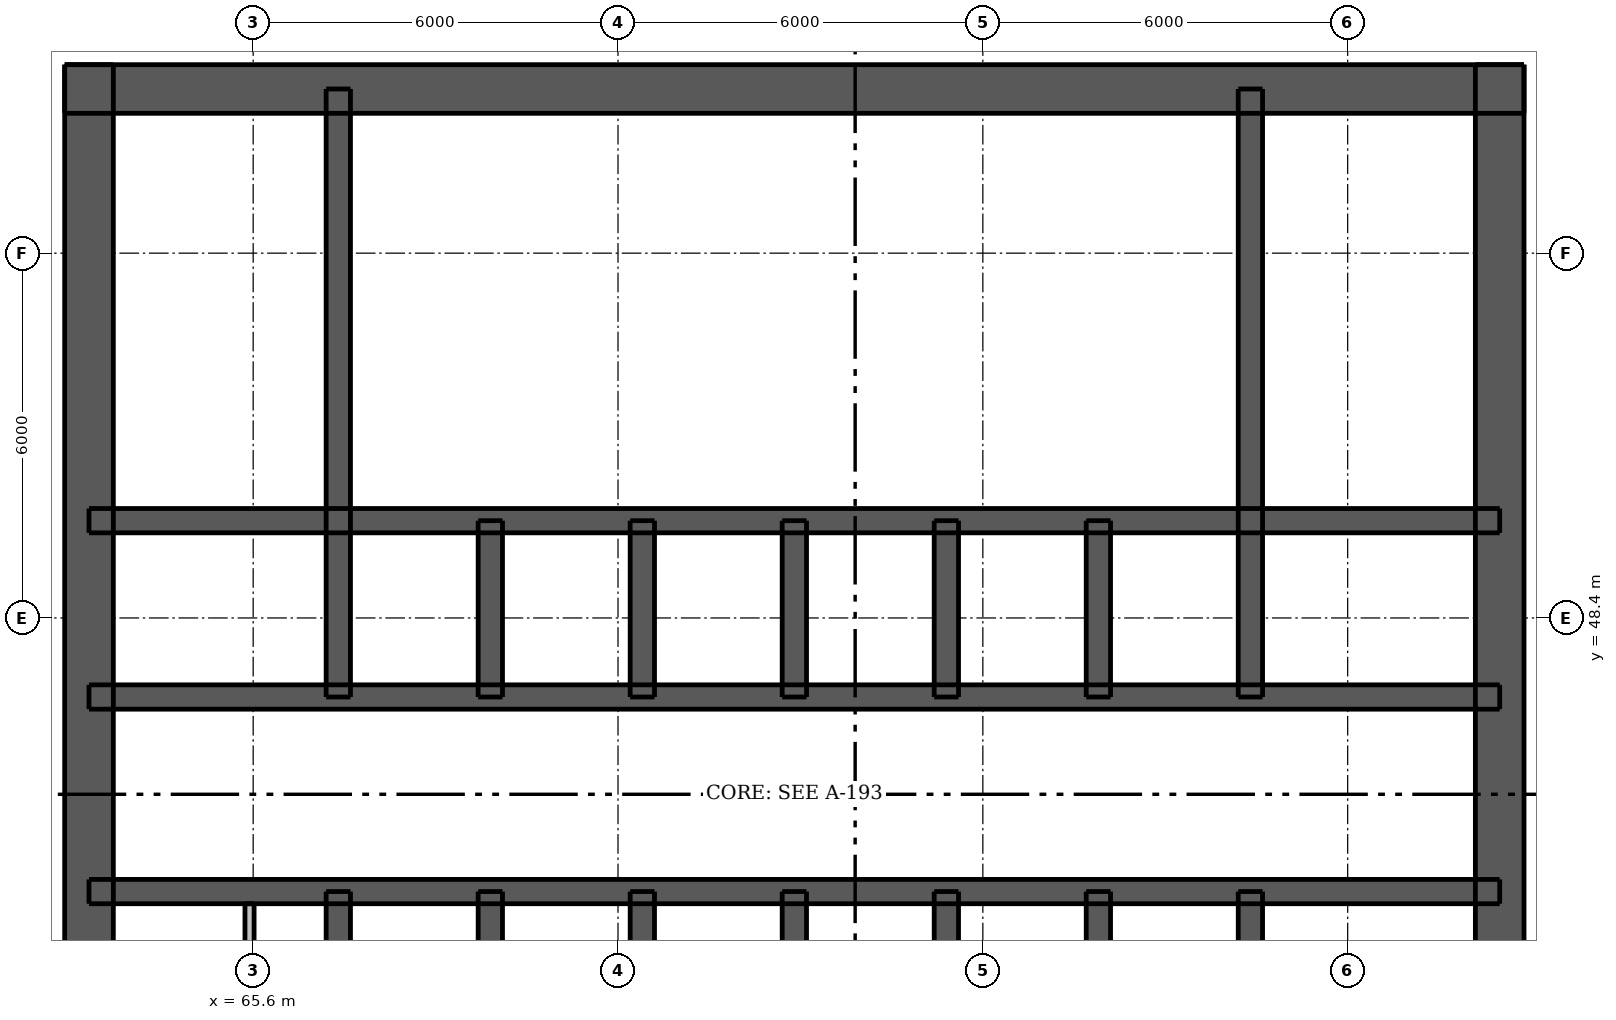
"""IFC4 building model, lengths in metres.
Left out: names, types, materials, properties, quantities, classifications, styles, units other than length and angle.
Written with IfcOpenShell. Run it as: python <this file> out.ifc"""

import sys

from ifc_helpers import new_model, si_unit, direction, frame, frame_2d, origin, place, context, subcontext, project, spatial, rectangle, extrude, element, fill, save


model = new_model("IFC4")
c1 = context("Model", 3, precision=1e-05, world=origin(), true_north=direction((0.0, 1.0)))
c2 = subcontext(c1, "Body", "Model", "MODEL_VIEW")
j1 = project(units=[si_unit("LENGTHUNIT", "METRE"), si_unit("PLANEANGLEUNIT", "RADIAN")], contexts=[c1])
p1 = place(None, origin())
s1 = spatial("IfcSite", under=j1, at=p1, CompositionType="ELEMENT")
p2 = place(p1, origin())
s2 = spatial("IfcBuilding", under=s1, at=p2, CompositionType="ELEMENT")
p3 = place(p2, frame((0.0, 0.0, 88.6)))
s3 = spatial("IfcBuildingStorey", under=s2, at=p3, CompositionType="ELEMENT", Elevation=88.6)
p4 = place(p3, frame((62.5, 57.1, 0.0), z_axis=(0.0, 0.0, 1.0), x_axis=(1.0, 0.0, 0.0)))
e1 = element("IfcWall", 1, at=p4, inside=s3, PredefinedType="SHEAR", context=c2, shape_type="SweptSolid", body=[
    extrude(rectangle(XDim=24.0, YDim=0.8, at=frame_2d((12.0, 0.0))), origin(), (0.0, 0.0, 1.0), 3.05),
])
p5 = place(p4, frame((20.9, 0.0, 0.0)))
e2 = element("IfcOpeningElement", 2, at=p5, cuts=e1, PredefinedType="OPENING", context=c2, shape_type="SweptSolid", body=[
    extrude(rectangle(XDim=1.1, YDim=2.1, at=frame_2d((0.55, 1.05))), frame((0.0, 0.41, 0.0), z_axis=(0.0, -1.0, 0.0), x_axis=(1.0, 0.0, 0.0)), (0.0, 0.0, 1.0), 0.82),
])
p6 = place(p4, frame((2.0, 0.0, 0.0)))
e3 = element("IfcOpeningElement", 3, at=p6, cuts=e1, PredefinedType="OPENING", context=c2, shape_type="SweptSolid", body=[
    extrude(rectangle(XDim=1.1, YDim=2.1, at=frame_2d((0.55, 1.05))), frame((0.0, 0.41, 0.0), z_axis=(0.0, -1.0, 0.0), x_axis=(1.0, 0.0, 0.0)), (0.0, 0.0, 1.0), 0.82),
])
p7 = place(p4, frame((11.55, 0.0, 0.0)))
e4 = element("IfcOpeningElement", 4, at=p7, cuts=e1, PredefinedType="OPENING", context=c2, shape_type="SweptSolid", body=[
    extrude(rectangle(XDim=0.9, YDim=2.1, at=frame_2d((0.45, 1.05))), frame((0.0, 0.41, 0.0), z_axis=(0.0, -1.0, 0.0), x_axis=(1.0, 0.0, 0.0)), (0.0, 0.0, 1.0), 0.82),
])
p8 = place(p3, frame((62.9, 33.5, 0.0), z_axis=(0.0, 0.0, 1.0), x_axis=(0.0, 1.0, 0.0)))
e5 = element("IfcWall", 5, at=p8, inside=s3, PredefinedType="SHEAR", context=c2, shape_type="SweptSolid", body=[
    extrude(rectangle(XDim=24.0, YDim=0.8, at=frame_2d((12.0, 0.0))), origin(), (0.0, 0.0, 1.0), 3.05),
])
p9 = place(p8, frame((11.2, 0.0, 0.0)))
e6 = element("IfcOpeningElement", 6, at=p9, cuts=e5, PredefinedType="OPENING", context=c2, shape_type="SweptSolid", body=[
    extrude(rectangle(XDim=1.6, YDim=2.1, at=frame_2d((0.8, 1.05))), frame((0.0, 0.41, 0.0), z_axis=(0.0, -1.0, 0.0), x_axis=(1.0, 0.0, 0.0)), (0.0, 0.0, 1.0), 0.82),
])
p10 = place(p3, frame((86.1, 33.5, 0.0), z_axis=(0.0, 0.0, 1.0), x_axis=(0.0, 1.0, 0.0)))
e7 = element("IfcWall", 7, at=p10, inside=s3, PredefinedType="SHEAR", context=c2, shape_type="SweptSolid", body=[
    extrude(rectangle(XDim=24.0, YDim=0.8, at=frame_2d((12.0, 0.0))), origin(), (0.0, 0.0, 1.0), 3.05),
])
p11 = place(p10, frame((11.2, 0.0, 0.0)))
e8 = element("IfcOpeningElement", 8, at=p11, cuts=e7, PredefinedType="OPENING", context=c2, shape_type="SweptSolid", body=[
    extrude(rectangle(XDim=1.6, YDim=2.1, at=frame_2d((0.8, 1.05))), frame((0.0, 0.41, 0.0), z_axis=(0.0, -1.0, 0.0), x_axis=(1.0, 0.0, 0.0)), (0.0, 0.0, 1.0), 0.82),
])
p12 = place(p3, frame((62.9, 43.9, 0.0), z_axis=(0.0, 0.0, 1.0), x_axis=(1.0, 0.0, 0.0)))
e9 = element("IfcWall", 9, at=p12, inside=s3, PredefinedType="SHEAR", context=c2, shape_type="SweptSolid", body=[
    extrude(rectangle(XDim=23.2, YDim=0.4, at=frame_2d((11.6, 0.0))), origin(), (0.0, 0.0, 1.0), 3.05),
])
p13 = place(p12, frame((1.07, 0.0, 0.0)))
e10 = element("IfcOpeningElement", 10, at=p13, cuts=e9, PredefinedType="OPENING", context=c2, shape_type="SweptSolid", body=[
    extrude(rectangle(XDim=0.9, YDim=2.1, at=frame_2d((0.45, 1.05))), frame((0.0, 0.21, 0.0), z_axis=(0.0, -1.0, 0.0), x_axis=(1.0, 0.0, 0.0)), (0.0, 0.0, 1.0), 0.42),
])
p14 = place(p12, frame((2.87, 0.0, 0.0)))
e11 = element("IfcOpeningElement", 11, at=p14, cuts=e9, PredefinedType="OPENING", context=c2, shape_type="SweptSolid", body=[
    extrude(rectangle(XDim=0.8, YDim=2.1, at=frame_2d((0.4, 1.05))), frame((0.0, 0.21, 0.0), z_axis=(0.0, -1.0, 0.0), x_axis=(1.0, 0.0, 0.0)), (0.0, 0.0, 1.0), 0.42),
])
p15 = place(p12, frame((20.6, 0.0, 0.0)))
e12 = element("IfcOpeningElement", 12, at=p15, cuts=e9, PredefinedType="OPENING", context=c2, shape_type="SweptSolid", body=[
    extrude(rectangle(XDim=0.9, YDim=2.1, at=frame_2d((0.45, 1.05))), frame((0.0, 0.21, 0.0), z_axis=(0.0, -1.0, 0.0), x_axis=(1.0, 0.0, 0.0)), (0.0, 0.0, 1.0), 0.42),
])
p16 = place(p12, frame((4.8, 0.0, 0.0)))
e13 = element("IfcOpeningElement", 13, at=p16, cuts=e9, PredefinedType="OPENING", context=c2, shape_type="SweptSolid", body=[
    extrude(rectangle(XDim=1.1, YDim=2.1, at=frame_2d((0.55, 1.05))), frame((0.0, 0.21, 0.0), z_axis=(0.0, -1.0, 0.0), x_axis=(1.0, 0.0, 0.0)), (0.0, 0.0, 1.0), 0.42),
])
p17 = place(p12, frame((7.3, 0.0, 0.0)))
e14 = element("IfcOpeningElement", 14, at=p17, cuts=e9, PredefinedType="OPENING", context=c2, shape_type="SweptSolid", body=[
    extrude(rectangle(XDim=1.1, YDim=2.1, at=frame_2d((0.55, 1.05))), frame((0.0, 0.21, 0.0), z_axis=(0.0, -1.0, 0.0), x_axis=(1.0, 0.0, 0.0)), (0.0, 0.0, 1.0), 0.42),
])
p18 = place(p12, frame((9.8, 0.0, 0.0)))
e15 = element("IfcOpeningElement", 15, at=p18, cuts=e9, PredefinedType="OPENING", context=c2, shape_type="SweptSolid", body=[
    extrude(rectangle(XDim=1.1, YDim=2.1, at=frame_2d((0.55, 1.05))), frame((0.0, 0.21, 0.0), z_axis=(0.0, -1.0, 0.0), x_axis=(1.0, 0.0, 0.0)), (0.0, 0.0, 1.0), 0.42),
])
p19 = place(p12, frame((12.3, 0.0, 0.0)))
e16 = element("IfcOpeningElement", 16, at=p19, cuts=e9, PredefinedType="OPENING", context=c2, shape_type="SweptSolid", body=[
    extrude(rectangle(XDim=1.1, YDim=2.1, at=frame_2d((0.55, 1.05))), frame((0.0, 0.21, 0.0), z_axis=(0.0, -1.0, 0.0), x_axis=(1.0, 0.0, 0.0)), (0.0, 0.0, 1.0), 0.42),
])
p20 = place(p12, frame((14.8, 0.0, 0.0)))
e17 = element("IfcOpeningElement", 17, at=p20, cuts=e9, PredefinedType="OPENING", context=c2, shape_type="SweptSolid", body=[
    extrude(rectangle(XDim=1.1, YDim=2.1, at=frame_2d((0.55, 1.05))), frame((0.0, 0.21, 0.0), z_axis=(0.0, -1.0, 0.0), x_axis=(1.0, 0.0, 0.0)), (0.0, 0.0, 1.0), 0.42),
])
p21 = place(p12, frame((17.3, 0.0, 0.0)))
e18 = element("IfcOpeningElement", 18, at=p21, cuts=e9, PredefinedType="OPENING", context=c2, shape_type="SweptSolid", body=[
    extrude(rectangle(XDim=1.1, YDim=2.1, at=frame_2d((0.55, 1.05))), frame((0.0, 0.21, 0.0), z_axis=(0.0, -1.0, 0.0), x_axis=(1.0, 0.0, 0.0)), (0.0, 0.0, 1.0), 0.42),
])
p22 = place(p3, frame((62.9, 47.1, 0.0), z_axis=(0.0, 0.0, 1.0), x_axis=(1.0, 0.0, 0.0)))
e19 = element("IfcWall", 19, at=p22, inside=s3, PredefinedType="SHEAR", context=c2, shape_type="SweptSolid", body=[
    extrude(rectangle(XDim=23.2, YDim=0.4, at=frame_2d((11.6, 0.0))), origin(), (0.0, 0.0, 1.0), 3.05),
])
p23 = place(p22, frame((1.7, 0.0, 0.0)))
e20 = element("IfcOpeningElement", 20, at=p23, cuts=e19, PredefinedType="OPENING", context=c2, shape_type="SweptSolid", body=[
    extrude(rectangle(XDim=0.9, YDim=2.1, at=frame_2d((0.45, 1.05))), frame((0.0, 0.21, 0.0), z_axis=(0.0, -1.0, 0.0), x_axis=(1.0, 0.0, 0.0)), (0.0, 0.0, 1.0), 0.42),
])
p24 = place(p22, frame((20.6, 0.0, 0.0)))
e21 = element("IfcOpeningElement", 21, at=p24, cuts=e19, PredefinedType="OPENING", context=c2, shape_type="SweptSolid", body=[
    extrude(rectangle(XDim=0.9, YDim=2.1, at=frame_2d((0.45, 1.05))), frame((0.0, 0.21, 0.0), z_axis=(0.0, -1.0, 0.0), x_axis=(1.0, 0.0, 0.0)), (0.0, 0.0, 1.0), 0.42),
])
p25 = place(p3, frame((62.9, 50.0, 0.0), z_axis=(0.0, 0.0, 1.0), x_axis=(1.0, 0.0, 0.0)))
e22 = element("IfcWall", 22, at=p25, inside=s3, PredefinedType="SHEAR", context=c2, shape_type="SweptSolid", body=[
    extrude(rectangle(XDim=23.2, YDim=0.4, at=frame_2d((11.6, 0.0))), origin(), (0.0, 0.0, 1.0), 3.05),
])
p26 = place(p3, frame((67.0, 33.9, 0.0), z_axis=(0.0, 0.0, 1.0), x_axis=(0.0, 1.0, 0.0)))
e23 = element("IfcWall", 23, at=p26, inside=s3, PredefinedType="SHEAR", context=c2, shape_type="SweptSolid", body=[
    extrude(rectangle(XDim=10.0, YDim=0.4, at=frame_2d((5.0, 0.0))), origin(), (0.0, 0.0, 1.0), 3.05),
])
p27 = place(p26, frame((0.6, 0.0, 0.0)))
e24 = element("IfcOpeningElement", 24, at=p27, cuts=e23, PredefinedType="OPENING", context=c2, shape_type="SweptSolid", body=[
    extrude(rectangle(XDim=1.1, YDim=2.1, at=frame_2d((0.55, 1.05))), frame((0.0, 0.21, 0.0), z_axis=(0.0, -1.0, 0.0), x_axis=(1.0, 0.0, 0.0)), (0.0, 0.0, 1.0), 0.42),
])
for number, where, z_axis, x_axis in (
    (25, (67.0, 47.1, 0.0), (0.0, 0.0, 1.0), (0.0, 1.0, 0.0)),
    (26, (82.0, 33.9, 0.0), (0.0, 0.0, 1.0), (0.0, 1.0, 0.0)),
    (27, (82.0, 47.1, 0.0), (0.0, 0.0, 1.0), (0.0, 1.0, 0.0)),
):
    element("IfcWall", number, at=place(p3, frame(where, z_axis=z_axis, x_axis=x_axis)), inside=s3, PredefinedType="SHEAR", context=c2, shape_type="SweptSolid", body=[
        extrude(rectangle(XDim=10.0, YDim=0.4, at=frame_2d((5.0, 0.0))), origin(), (0.0, 0.0, 1.0), 3.05),
    ])
for number, where, z_axis, x_axis in (
    (28, (69.5, 41.0, 0.0), (0.0, 0.0, 1.0), (0.0, 1.0, 0.0)),
    (29, (69.5, 47.1, 0.0), (0.0, 0.0, 1.0), (0.0, 1.0, 0.0)),
    (30, (72.0, 41.0, 0.0), (0.0, 0.0, 1.0), (0.0, 1.0, 0.0)),
    (31, (72.0, 47.1, 0.0), (0.0, 0.0, 1.0), (0.0, 1.0, 0.0)),
    (32, (74.5, 41.0, 0.0), (0.0, 0.0, 1.0), (0.0, 1.0, 0.0)),
    (33, (74.5, 47.1, 0.0), (0.0, 0.0, 1.0), (0.0, 1.0, 0.0)),
    (34, (77.0, 41.0, 0.0), (0.0, 0.0, 1.0), (0.0, 1.0, 0.0)),
    (35, (77.0, 47.1, 0.0), (0.0, 0.0, 1.0), (0.0, 1.0, 0.0)),
    (36, (79.5, 41.0, 0.0), (0.0, 0.0, 1.0), (0.0, 1.0, 0.0)),
    (37, (79.5, 47.1, 0.0), (0.0, 0.0, 1.0), (0.0, 1.0, 0.0)),
):
    element("IfcWall", number, at=place(p3, frame(where, z_axis=z_axis, x_axis=x_axis)), inside=s3, PredefinedType="SHEAR", context=c2, shape_type="SweptSolid", body=[
        extrude(rectangle(XDim=2.9, YDim=0.4, at=frame_2d((1.45, 0.0))), origin(), (0.0, 0.0, 1.0), 3.05),
    ])
p28 = place(p3, frame((65.54, 41.2, 0.0), z_axis=(0.0, 0.0, 1.0), x_axis=(0.0, 1.0, 0.0)))
e38 = element("IfcWall", 38, at=p28, inside=s3, PredefinedType="PLUMBINGWALL", context=c2, shape_type="SweptSolid", body=[
    extrude(rectangle(XDim=2.5, YDim=0.15, at=frame_2d((1.25, 0.0))), origin(), (0.0, 0.0, 1.0), 3.05),
])
p29 = place(p5, origin())
e39 = element("IfcDoor", 39, at=p29, inside=s3, OperationType="SINGLE_SWING_RIGHT", PredefinedType="DOOR", context=c2, shape_type="SweptSolid", body=[
    extrude(rectangle(XDim=1.1, YDim=2.1, at=frame_2d((0.55, 1.05))), frame((0.0, -0.337, 0.0), z_axis=(0.0, -1.0, 0.0), x_axis=(1.0, 0.0, 0.0)), (0.0, 0.0, 1.0), 0.05),
])
fill(e2, e39)
p30 = place(p6, origin())
e40 = element("IfcDoor", 40, at=p30, inside=s3, OperationType="SINGLE_SWING_LEFT", PredefinedType="DOOR", context=c2, shape_type="SweptSolid", body=[
    extrude(rectangle(XDim=1.1, YDim=2.1, at=frame_2d((0.55, 1.05))), frame((0.0, -0.337, 0.0), z_axis=(0.0, -1.0, 0.0), x_axis=(1.0, 0.0, 0.0)), (0.0, 0.0, 1.0), 0.05),
])
fill(e3, e40)
p31 = place(p9, origin())
e41 = element("IfcDoor", 41, at=p31, inside=s3, OperationType="DOUBLE_DOOR_SINGLE_SWING", PredefinedType="DOOR", context=c2, shape_type="SweptSolid", body=[
    extrude(rectangle(XDim=1.6, YDim=2.1, at=frame_2d((0.8, 1.05))), frame((0.0, -0.337, 0.0), z_axis=(0.0, -1.0, 0.0), x_axis=(1.0, 0.0, 0.0)), (0.0, 0.0, 1.0), 0.05),
])
fill(e6, e41)
p32 = place(p11, origin())
e42 = element("IfcDoor", 42, at=p32, inside=s3, OperationType="DOUBLE_DOOR_SINGLE_SWING", PredefinedType="DOOR", context=c2, shape_type="SweptSolid", body=[
    extrude(rectangle(XDim=1.6, YDim=2.1, at=frame_2d((0.8, 1.05))), frame((0.0, 0.388, 0.0), z_axis=(0.0, -1.0, 0.0), x_axis=(1.0, 0.0, 0.0)), (0.0, 0.0, 1.0), 0.05),
])
fill(e8, e42)
p33 = place(p13, origin())
e43 = element("IfcDoor", 43, at=p33, inside=s3, OperationType="SINGLE_SWING_LEFT", PredefinedType="DOOR", context=c2, shape_type="SweptSolid", body=[
    extrude(rectangle(XDim=0.9, YDim=2.1, at=frame_2d((0.45, 1.05))), frame((0.0, -0.138, 0.0), z_axis=(0.0, -1.0, 0.0), x_axis=(1.0, 0.0, 0.0)), (0.0, 0.0, 1.0), 0.05),
])
fill(e10, e43)
p34 = place(p14, origin())
e44 = element("IfcDoor", 44, at=p34, inside=s3, OperationType="SINGLE_SWING_RIGHT", PredefinedType="DOOR", context=c2, shape_type="SweptSolid", body=[
    extrude(rectangle(XDim=0.8, YDim=2.1, at=frame_2d((0.4, 1.05))), frame((0.0, -0.138, 0.0), z_axis=(0.0, -1.0, 0.0), x_axis=(1.0, 0.0, 0.0)), (0.0, 0.0, 1.0), 0.05),
])
fill(e11, e44)
p35 = place(p15, origin())
e45 = element("IfcDoor", 45, at=p35, inside=s3, OperationType="SINGLE_SWING_LEFT", PredefinedType="DOOR", context=c2, shape_type="SweptSolid", body=[
    extrude(rectangle(XDim=0.9, YDim=2.1, at=frame_2d((0.45, 1.05))), frame((0.0, -0.138, 0.0), z_axis=(0.0, -1.0, 0.0), x_axis=(1.0, 0.0, 0.0)), (0.0, 0.0, 1.0), 0.05),
])
fill(e12, e45)
p36 = place(p23, origin())
e46 = element("IfcDoor", 46, at=p36, inside=s3, OperationType="SINGLE_SWING_LEFT", PredefinedType="DOOR", context=c2, shape_type="SweptSolid", body=[
    extrude(rectangle(XDim=0.9, YDim=2.1, at=frame_2d((0.45, 1.05))), frame((0.0, 0.188, 0.0), z_axis=(0.0, -1.0, 0.0), x_axis=(1.0, 0.0, 0.0)), (0.0, 0.0, 1.0), 0.05),
])
fill(e20, e46)
p37 = place(p24, origin())
e47 = element("IfcDoor", 47, at=p37, inside=s3, OperationType="SINGLE_SWING_LEFT", PredefinedType="DOOR", context=c2, shape_type="SweptSolid", body=[
    extrude(rectangle(XDim=0.9, YDim=2.1, at=frame_2d((0.45, 1.05))), frame((0.0, 0.188, 0.0), z_axis=(0.0, -1.0, 0.0), x_axis=(1.0, 0.0, 0.0)), (0.0, 0.0, 1.0), 0.05),
])
fill(e21, e47)
p38 = place(p7, origin())
e48 = element("IfcDoor", 48, at=p38, inside=s3, OperationType="SINGLE_SWING_RIGHT", PredefinedType="DOOR", context=c2, shape_type="SweptSolid", body=[
    extrude(rectangle(XDim=0.9, YDim=2.1, at=frame_2d((0.45, 1.05))), frame((0.0, -0.337, 0.0), z_axis=(0.0, -1.0, 0.0), x_axis=(1.0, 0.0, 0.0)), (0.0, 0.0, 1.0), 0.05),
])
fill(e4, e48)
p39 = place(p16, origin())
e49 = element("IfcDoor", 49, at=p39, inside=s3, OperationType="DOUBLE_DOOR_SLIDING", PredefinedType="DOOR", context=c2, shape_type="SweptSolid", body=[
    extrude(rectangle(XDim=1.1, YDim=2.1, at=frame_2d((0.55, 1.05))), frame((0.0, 0.025, 0.0), z_axis=(0.0, -1.0, 0.0), x_axis=(1.0, 0.0, 0.0)), (0.0, 0.0, 1.0), 0.05),
])
fill(e13, e49)
p40 = place(p17, origin())
e50 = element("IfcDoor", 50, at=p40, inside=s3, OperationType="DOUBLE_DOOR_SLIDING", PredefinedType="DOOR", context=c2, shape_type="SweptSolid", body=[
    extrude(rectangle(XDim=1.1, YDim=2.1, at=frame_2d((0.55, 1.05))), frame((0.0, 0.025, 0.0), z_axis=(0.0, -1.0, 0.0), x_axis=(1.0, 0.0, 0.0)), (0.0, 0.0, 1.0), 0.05),
])
fill(e14, e50)
p41 = place(p18, origin())
e51 = element("IfcDoor", 51, at=p41, inside=s3, OperationType="DOUBLE_DOOR_SLIDING", PredefinedType="DOOR", context=c2, shape_type="SweptSolid", body=[
    extrude(rectangle(XDim=1.1, YDim=2.1, at=frame_2d((0.55, 1.05))), frame((0.0, 0.025, 0.0), z_axis=(0.0, -1.0, 0.0), x_axis=(1.0, 0.0, 0.0)), (0.0, 0.0, 1.0), 0.05),
])
fill(e15, e51)
p42 = place(p19, origin())
e52 = element("IfcDoor", 52, at=p42, inside=s3, OperationType="DOUBLE_DOOR_SLIDING", PredefinedType="DOOR", context=c2, shape_type="SweptSolid", body=[
    extrude(rectangle(XDim=1.1, YDim=2.1, at=frame_2d((0.55, 1.05))), frame((0.0, 0.025, 0.0), z_axis=(0.0, -1.0, 0.0), x_axis=(1.0, 0.0, 0.0)), (0.0, 0.0, 1.0), 0.05),
])
fill(e16, e52)
p43 = place(p20, origin())
e53 = element("IfcDoor", 53, at=p43, inside=s3, OperationType="DOUBLE_DOOR_SLIDING", PredefinedType="DOOR", context=c2, shape_type="SweptSolid", body=[
    extrude(rectangle(XDim=1.1, YDim=2.1, at=frame_2d((0.55, 1.05))), frame((0.0, 0.025, 0.0), z_axis=(0.0, -1.0, 0.0), x_axis=(1.0, 0.0, 0.0)), (0.0, 0.0, 1.0), 0.05),
])
fill(e17, e53)
p44 = place(p21, origin())
e54 = element("IfcDoor", 54, at=p44, inside=s3, OperationType="DOUBLE_DOOR_SLIDING", PredefinedType="DOOR", context=c2, shape_type="SweptSolid", body=[
    extrude(rectangle(XDim=1.1, YDim=2.1, at=frame_2d((0.55, 1.05))), frame((0.0, 0.025, 0.0), z_axis=(0.0, -1.0, 0.0), x_axis=(1.0, 0.0, 0.0)), (0.0, 0.0, 1.0), 0.05),
])
fill(e18, e54)
save(model, sys.argv[1])
